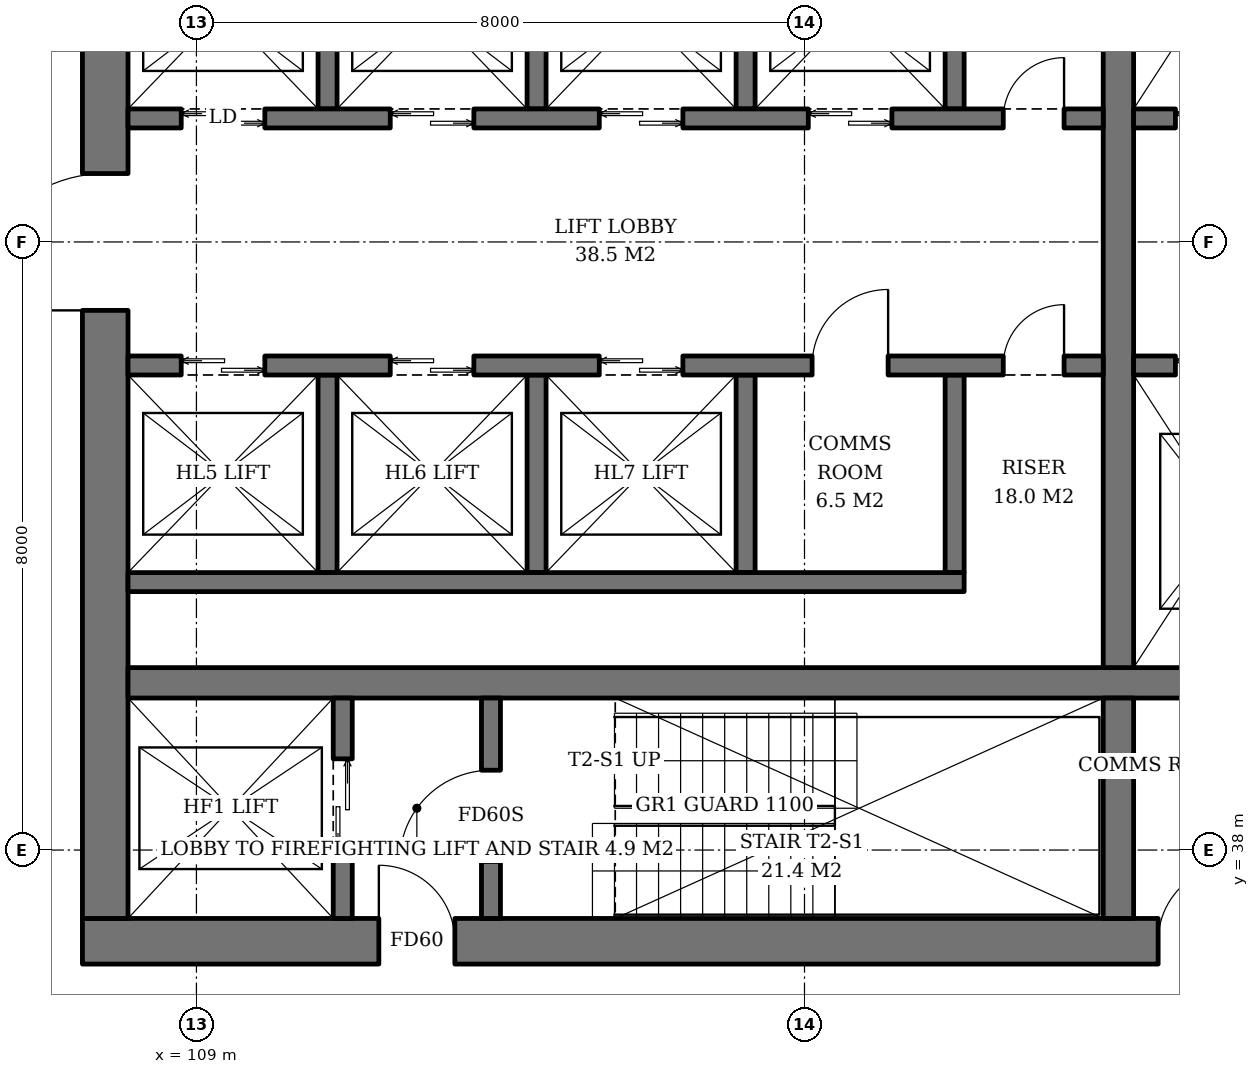
"""IFC4 building model, lengths in metres.
Left out: names, types, materials, properties, quantities, classifications, styles, units other than length and angle.
Written with IfcOpenShell. Run it as: python <this file> out.ifc"""

import sys

from ifc_helpers import new_model, si_unit, direction, frame, frame_2d, origin, place, context, subcontext, project, spatial, rectangle, extrude, element, fill, save


model = new_model("IFC4")
c1 = context("Model", 3, precision=1e-05, world=origin(), true_north=direction((0.0, 1.0)))
c2 = subcontext(c1, "Body", "Model", "MODEL_VIEW")
j1 = project(units=[si_unit("LENGTHUNIT", "METRE"), si_unit("PLANEANGLEUNIT", "RADIAN")], contexts=[c1])
p1 = place(None, origin())
s1 = spatial("IfcSite", under=j1, at=p1, CompositionType="ELEMENT")
p2 = place(p1, origin())
s2 = spatial("IfcBuilding", under=s1, at=p2, CompositionType="ELEMENT")
p3 = place(p2, frame((0.0, 0.0, 97.0)))
s3 = spatial("IfcBuildingStorey", under=s2, at=p3, CompositionType="ELEMENT", Elevation=97.0)
p4 = place(p3, frame((107.5, 36.8, 0.0), z_axis=(0.0, 0.0, 1.0), x_axis=(1.0, 0.0, 0.0)))
e1 = element("IfcWall", 1, at=p4, inside=s3, PredefinedType="SHEAR", context=c2, shape_type="SweptSolid", body=[
    extrude(rectangle(XDim=19.0, YDim=0.6, at=frame_2d((9.5, 0.0))), origin(), (0.0, 0.0, 1.0), 3.8),
])
p5 = place(p4, frame((3.9, 0.0, 0.0)))
e2 = element("IfcOpeningElement", 2, at=p5, cuts=e1, PredefinedType="OPENING", context=c2, shape_type="SweptSolid", body=[
    extrude(rectangle(XDim=1.0, YDim=2.1, at=frame_2d((0.5, 1.05))), frame((0.0, 0.31, 0.0), z_axis=(0.0, -1.0, 0.0), x_axis=(1.0, 0.0, 0.0)), (0.0, 0.0, 1.0), 0.62),
])
p6 = place(p4, frame((14.153, 0.0, 0.0)))
e3 = element("IfcOpeningElement", 3, at=p6, cuts=e1, PredefinedType="OPENING", context=c2, shape_type="SweptSolid", body=[
    extrude(rectangle(XDim=1.0, YDim=2.1, at=frame_2d((0.5, 1.05))), frame((0.0, 0.31, 0.0), z_axis=(0.0, -1.0, 0.0), x_axis=(1.0, 0.0, 0.0)), (0.0, 0.0, 1.0), 0.62),
])
p7 = place(p4, frame((16.2, 0.0, 0.0)))
e4 = element("IfcOpeningElement", 4, at=p7, cuts=e1, PredefinedType="OPENING", context=c2, shape_type="SweptSolid", body=[
    extrude(rectangle(XDim=1.0, YDim=2.1, at=frame_2d((0.5, 1.05))), frame((0.0, 0.31, 0.0), z_axis=(0.0, -1.0, 0.0), x_axis=(1.0, 0.0, 0.0)), (0.0, 0.0, 1.0), 0.62),
])
p8 = place(p3, frame((107.8, 37.1, 0.0), z_axis=(0.0, 0.0, 1.0), x_axis=(0.0, 1.0, 0.0)))
e5 = element("IfcWall", 5, at=p8, inside=s3, PredefinedType="SHEAR", context=c2, shape_type="SweptSolid", body=[
    extrude(rectangle(XDim=17.8, YDim=0.6, at=frame_2d((8.9, 0.0))), origin(), (0.0, 0.0, 1.0), 3.8),
])
p9 = place(p8, frame((8.0, 0.0, 0.0)))
e6 = element("IfcOpeningElement", 6, at=p9, cuts=e5, PredefinedType="OPENING", context=c2, shape_type="SweptSolid", body=[
    extrude(rectangle(XDim=1.8, YDim=2.4, at=frame_2d((0.9, 1.2))), frame((0.0, 0.31, 0.0), z_axis=(0.0, -1.0, 0.0), x_axis=(1.0, 0.0, 0.0)), (0.0, 0.0, 1.0), 0.62),
])
p10 = place(p3, frame((108.1, 40.2, 0.0), z_axis=(0.0, 0.0, 1.0), x_axis=(1.0, 0.0, 0.0)))
e7 = element("IfcWall", 7, at=p10, inside=s3, PredefinedType="SHEAR", context=c2, shape_type="SweptSolid", body=[
    extrude(rectangle(XDim=17.8, YDim=0.4, at=frame_2d((8.9, 0.0))), origin(), (0.0, 0.0, 1.0), 3.8),
])
p11 = place(p3, frame((121.13, 37.1, 0.0), z_axis=(0.0, 0.0, 1.0), x_axis=(0.0, 1.0, 0.0)))
e8 = element("IfcWall", 8, at=p11, inside=s3, PredefinedType="SHEAR", context=c2, shape_type="SweptSolid", body=[
    extrude(rectangle(XDim=2.9, YDim=0.4, at=frame_2d((1.45, 0.0))), origin(), (0.0, 0.0, 1.0), 3.8),
])
p12 = place(p3, frame((121.13, 40.4, 0.0), z_axis=(0.0, 0.0, 1.0), x_axis=(0.0, 1.0, 0.0)))
e9 = element("IfcWall", 9, at=p12, inside=s3, PredefinedType="SHEAR", context=c2, shape_type="SweptSolid", body=[
    extrude(rectangle(XDim=11.2, YDim=0.4, at=frame_2d((5.6, 0.0))), origin(), (0.0, 0.0, 1.0), 3.8),
])
p13 = place(p3, frame((110.925, 37.1, 0.0), z_axis=(0.0, 0.0, 1.0), x_axis=(0.0, 1.0, 0.0)))
e10 = element("IfcWall", 10, at=p13, inside=s3, PredefinedType="SHEAR", context=c2, shape_type="SweptSolid", body=[
    extrude(rectangle(XDim=2.9, YDim=0.25, at=frame_2d((1.45, 0.0))), origin(), (0.0, 0.0, 1.0), 3.8),
])
p14 = place(p13, frame((0.8, 0.0, 0.0)))
e11 = element("IfcOpeningElement", 11, at=p14, cuts=e10, PredefinedType="OPENING", context=c2, shape_type="SweptSolid", body=[
    extrude(rectangle(XDim=1.3, YDim=2.2, at=frame_2d((0.65, 1.1))), frame((0.0, 0.135, 0.0), z_axis=(0.0, -1.0, 0.0), x_axis=(1.0, 0.0, 0.0)), (0.0, 0.0, 1.0), 0.27),
])
p15 = place(p3, frame((112.875, 37.1, 0.0), z_axis=(0.0, 0.0, 1.0), x_axis=(0.0, 1.0, 0.0)))
e12 = element("IfcWall", 12, at=p15, inside=s3, PredefinedType="SHEAR", context=c2, shape_type="SweptSolid", body=[
    extrude(rectangle(XDim=2.9, YDim=0.25, at=frame_2d((1.45, 0.0))), origin(), (0.0, 0.0, 1.0), 3.8),
])
p16 = place(p15, frame((0.75, 0.0, 0.0)))
e13 = element("IfcOpeningElement", 13, at=p16, cuts=e12, PredefinedType="OPENING", context=c2, shape_type="SweptSolid", body=[
    extrude(rectangle(XDim=1.2, YDim=2.1, at=frame_2d((0.6, 1.05))), frame((0.0, 0.135, 0.0), z_axis=(0.0, -1.0, 0.0), x_axis=(1.0, 0.0, 0.0)), (0.0, 0.0, 1.0), 0.27),
])
for number, where, z_axis, x_axis in (
    (14, (110.725, 47.75, 0.0), (0.0, 0.0, 1.0), (0.0, 1.0, 0.0)),
    (15, (113.475, 47.75, 0.0), (0.0, 0.0, 1.0), (0.0, 1.0, 0.0)),
    (16, (116.225, 47.75, 0.0), (0.0, 0.0, 1.0), (0.0, 1.0, 0.0)),
    (17, (118.975, 47.75, 0.0), (0.0, 0.0, 1.0), (0.0, 1.0, 0.0)),
):
    element("IfcWall", number, at=place(p3, frame(where, z_axis=z_axis, x_axis=x_axis)), inside=s3, PredefinedType="SHEAR", context=c2, shape_type="SweptSolid", body=[
        extrude(rectangle(XDim=2.6, YDim=0.25, at=frame_2d((1.3, 0.0))), origin(), (0.0, 0.0, 1.0), 3.8),
    ])
p17 = place(p3, frame((108.1, 47.625, 0.0), z_axis=(0.0, 0.0, 1.0), x_axis=(1.0, 0.0, 0.0)))
e18 = element("IfcWall", 18, at=p17, inside=s3, PredefinedType="SHEAR", context=c2, shape_type="SweptSolid", body=[
    extrude(rectangle(XDim=12.83, YDim=0.25, at=frame_2d((6.415, 0.0))), origin(), (0.0, 0.0, 1.0), 3.8),
])
p18 = place(p17, frame((0.7, 0.0, 0.0)))
e19 = element("IfcOpeningElement", 19, at=p18, cuts=e18, PredefinedType="OPENING", context=c2, shape_type="SweptSolid", body=[
    extrude(rectangle(XDim=1.1, YDim=2.2, at=frame_2d((0.55, 1.1))), frame((0.0, 0.135, 0.0), z_axis=(0.0, -1.0, 0.0), x_axis=(1.0, 0.0, 0.0)), (0.0, 0.0, 1.0), 0.27),
])
p19 = place(p17, frame((3.45, 0.0, 0.0)))
e20 = element("IfcOpeningElement", 20, at=p19, cuts=e18, PredefinedType="OPENING", context=c2, shape_type="SweptSolid", body=[
    extrude(rectangle(XDim=1.1, YDim=2.2, at=frame_2d((0.55, 1.1))), frame((0.0, 0.135, 0.0), z_axis=(0.0, -1.0, 0.0), x_axis=(1.0, 0.0, 0.0)), (0.0, 0.0, 1.0), 0.27),
])
p20 = place(p17, frame((6.2, 0.0, 0.0)))
e21 = element("IfcOpeningElement", 21, at=p20, cuts=e18, PredefinedType="OPENING", context=c2, shape_type="SweptSolid", body=[
    extrude(rectangle(XDim=1.1, YDim=2.2, at=frame_2d((0.55, 1.1))), frame((0.0, 0.135, 0.0), z_axis=(0.0, -1.0, 0.0), x_axis=(1.0, 0.0, 0.0)), (0.0, 0.0, 1.0), 0.27),
])
p21 = place(p17, frame((8.95, 0.0, 0.0)))
e22 = element("IfcOpeningElement", 22, at=p21, cuts=e18, PredefinedType="OPENING", context=c2, shape_type="SweptSolid", body=[
    extrude(rectangle(XDim=1.1, YDim=2.2, at=frame_2d((0.55, 1.1))), frame((0.0, 0.135, 0.0), z_axis=(0.0, -1.0, 0.0), x_axis=(1.0, 0.0, 0.0)), (0.0, 0.0, 1.0), 0.27),
])
p22 = place(p17, frame((11.515, 0.0, 0.0)))
e23 = element("IfcOpeningElement", 23, at=p22, cuts=e18, PredefinedType="OPENING", context=c2, shape_type="SweptSolid", body=[
    extrude(rectangle(XDim=0.8, YDim=2.0, at=frame_2d((0.4, 1.0))), frame((0.0, 0.135, 0.0), z_axis=(0.0, -1.0, 0.0), x_axis=(1.0, 0.0, 0.0)), (0.0, 0.0, 1.0), 0.27),
])
for number, where, z_axis, x_axis in (
    (24, (110.725, 44.25, 0.0), (0.0, 0.0, 1.0), (0.0, -1.0, 0.0)),
    (25, (113.475, 44.25, 0.0), (0.0, 0.0, 1.0), (0.0, -1.0, 0.0)),
    (26, (116.225, 44.25, 0.0), (0.0, 0.0, 1.0), (0.0, -1.0, 0.0)),
    (27, (118.975, 44.25, 0.0), (0.0, 0.0, 1.0), (0.0, -1.0, 0.0)),
):
    element("IfcWall", number, at=place(p3, frame(where, z_axis=z_axis, x_axis=x_axis)), inside=s3, PredefinedType="SHEAR", context=c2, shape_type="SweptSolid", body=[
        extrude(rectangle(XDim=2.6, YDim=0.25, at=frame_2d((1.3, 0.0))), origin(), (0.0, 0.0, 1.0), 3.8),
    ])
p23 = place(p3, frame((108.1, 41.525, 0.0), z_axis=(0.0, 0.0, 1.0), x_axis=(1.0, 0.0, 0.0)))
e28 = element("IfcWall", 28, at=p23, inside=s3, PredefinedType="SHEAR", context=c2, shape_type="SweptSolid", body=[
    extrude(rectangle(XDim=11.0, YDim=0.25, at=frame_2d((5.5, 0.0))), origin(), (0.0, 0.0, 1.0), 3.8),
])
p24 = place(p3, frame((108.1, 44.375, 0.0), z_axis=(0.0, 0.0, 1.0), x_axis=(1.0, 0.0, 0.0)))
e29 = element("IfcWall", 29, at=p24, inside=s3, PredefinedType="SHEAR", context=c2, shape_type="SweptSolid", body=[
    extrude(rectangle(XDim=12.83, YDim=0.25, at=frame_2d((6.415, 0.0))), origin(), (0.0, 0.0, 1.0), 3.8),
])
p25 = place(p24, frame((0.7, 0.0, 0.0)))
e30 = element("IfcOpeningElement", 30, at=p25, cuts=e29, PredefinedType="OPENING", context=c2, shape_type="SweptSolid", body=[
    extrude(rectangle(XDim=1.1, YDim=2.2, at=frame_2d((0.55, 1.1))), frame((0.0, 0.135, 0.0), z_axis=(0.0, -1.0, 0.0), x_axis=(1.0, 0.0, 0.0)), (0.0, 0.0, 1.0), 0.27),
])
p26 = place(p24, frame((3.45, 0.0, 0.0)))
e31 = element("IfcOpeningElement", 31, at=p26, cuts=e29, PredefinedType="OPENING", context=c2, shape_type="SweptSolid", body=[
    extrude(rectangle(XDim=1.1, YDim=2.2, at=frame_2d((0.55, 1.1))), frame((0.0, 0.135, 0.0), z_axis=(0.0, -1.0, 0.0), x_axis=(1.0, 0.0, 0.0)), (0.0, 0.0, 1.0), 0.27),
])
p27 = place(p24, frame((6.2, 0.0, 0.0)))
e32 = element("IfcOpeningElement", 32, at=p27, cuts=e29, PredefinedType="OPENING", context=c2, shape_type="SweptSolid", body=[
    extrude(rectangle(XDim=1.1, YDim=2.2, at=frame_2d((0.55, 1.1))), frame((0.0, 0.135, 0.0), z_axis=(0.0, -1.0, 0.0), x_axis=(1.0, 0.0, 0.0)), (0.0, 0.0, 1.0), 0.27),
])
p28 = place(p24, frame((9.0, 0.0, 0.0)))
e33 = element("IfcOpeningElement", 33, at=p28, cuts=e29, PredefinedType="OPENING", context=c2, shape_type="SweptSolid", body=[
    extrude(rectangle(XDim=1.0, YDim=2.1, at=frame_2d((0.5, 1.05))), frame((0.0, 0.135, 0.0), z_axis=(0.0, -1.0, 0.0), x_axis=(1.0, 0.0, 0.0)), (0.0, 0.0, 1.0), 0.27),
])
p29 = place(p24, frame((11.515, 0.0, 0.0)))
e34 = element("IfcOpeningElement", 34, at=p29, cuts=e29, PredefinedType="OPENING", context=c2, shape_type="SweptSolid", body=[
    extrude(rectangle(XDim=0.8, YDim=2.0, at=frame_2d((0.4, 1.0))), frame((0.0, 0.135, 0.0), z_axis=(0.0, -1.0, 0.0), x_axis=(1.0, 0.0, 0.0)), (0.0, 0.0, 1.0), 0.27),
])
p30 = place(p3, frame((121.33, 47.625, 0.0), z_axis=(0.0, 0.0, 1.0), x_axis=(1.0, 0.0, 0.0)))
e35 = element("IfcWall", 35, at=p30, inside=s3, PredefinedType="SHEAR", context=c2, shape_type="SweptSolid", body=[
    extrude(rectangle(XDim=4.57, YDim=0.25, at=frame_2d((2.285, 0.0))), origin(), (0.0, 0.0, 1.0), 3.8),
])
p31 = place(p30, frame((0.55, 0.0, 0.0)))
e36 = element("IfcOpeningElement", 36, at=p31, cuts=e35, PredefinedType="OPENING", context=c2, shape_type="SweptSolid", body=[
    extrude(rectangle(XDim=1.4, YDim=2.4, at=frame_2d((0.7, 1.2))), frame((0.0, 0.135, 0.0), z_axis=(0.0, -1.0, 0.0), x_axis=(1.0, 0.0, 0.0)), (0.0, 0.0, 1.0), 0.27),
])
p32 = place(p30, frame((3.26, 0.0, 0.0)))
e37 = element("IfcOpeningElement", 37, at=p32, cuts=e35, PredefinedType="OPENING", context=c2, shape_type="SweptSolid", body=[
    extrude(rectangle(XDim=0.8, YDim=2.0, at=frame_2d((0.4, 1.0))), frame((0.0, 0.135, 0.0), z_axis=(0.0, -1.0, 0.0), x_axis=(1.0, 0.0, 0.0)), (0.0, 0.0, 1.0), 0.27),
])
p33 = place(p3, frame((121.33, 44.375, 0.0), z_axis=(0.0, 0.0, 1.0), x_axis=(1.0, 0.0, 0.0)))
e38 = element("IfcWall", 38, at=p33, inside=s3, PredefinedType="SHEAR", context=c2, shape_type="SweptSolid", body=[
    extrude(rectangle(XDim=4.57, YDim=0.25, at=frame_2d((2.285, 0.0))), origin(), (0.0, 0.0, 1.0), 3.8),
])
p34 = place(p33, frame((0.55, 0.0, 0.0)))
e39 = element("IfcOpeningElement", 39, at=p34, cuts=e38, PredefinedType="OPENING", context=c2, shape_type="SweptSolid", body=[
    extrude(rectangle(XDim=1.4, YDim=2.4, at=frame_2d((0.7, 1.2))), frame((0.0, 0.135, 0.0), z_axis=(0.0, -1.0, 0.0), x_axis=(1.0, 0.0, 0.0)), (0.0, 0.0, 1.0), 0.27),
])
p35 = place(p33, frame((3.26, 0.0, 0.0)))
e40 = element("IfcOpeningElement", 40, at=p35, cuts=e38, PredefinedType="OPENING", context=c2, shape_type="SweptSolid", body=[
    extrude(rectangle(XDim=0.8, YDim=2.0, at=frame_2d((0.4, 1.0))), frame((0.0, 0.135, 0.0), z_axis=(0.0, -1.0, 0.0), x_axis=(1.0, 0.0, 0.0)), (0.0, 0.0, 1.0), 0.27),
])
p36 = place(p14, origin())
e41 = element("IfcDoor", 41, at=p36, inside=s3, OperationType="DOUBLE_DOOR_SLIDING", PredefinedType="DOOR", context=c2, shape_type="SweptSolid", body=[
    extrude(rectangle(XDim=1.3, YDim=2.2, at=frame_2d((0.65, 1.1))), frame((0.0, 0.025, 0.0), z_axis=(0.0, -1.0, 0.0), x_axis=(1.0, 0.0, 0.0)), (0.0, 0.0, 1.0), 0.05),
])
fill(e11, e41)
p37 = place(p16, origin())
e42 = element("IfcDoor", 42, at=p37, inside=s3, OperationType="SINGLE_SWING_LEFT", PredefinedType="DOOR", context=c2, shape_type="SweptSolid", body=[
    extrude(rectangle(XDim=1.2, YDim=2.1, at=frame_2d((0.6, 1.05))), frame((0.0, 0.025, 0.0), z_axis=(0.0, -1.0, 0.0), x_axis=(1.0, 0.0, 0.0)), (0.0, 0.0, 1.0), 0.05),
])
fill(e13, e42)
p38 = place(p18, origin())
e43 = element("IfcDoor", 43, at=p38, inside=s3, OperationType="DOUBLE_DOOR_SLIDING", PredefinedType="DOOR", context=c2, shape_type="SweptSolid", body=[
    extrude(rectangle(XDim=1.1, YDim=2.2, at=frame_2d((0.55, 1.1))), frame((0.0, 0.025, 0.0), z_axis=(0.0, -1.0, 0.0), x_axis=(1.0, 0.0, 0.0)), (0.0, 0.0, 1.0), 0.05),
])
fill(e19, e43)
p39 = place(p19, origin())
e44 = element("IfcDoor", 44, at=p39, inside=s3, OperationType="DOUBLE_DOOR_SLIDING", PredefinedType="DOOR", context=c2, shape_type="SweptSolid", body=[
    extrude(rectangle(XDim=1.1, YDim=2.2, at=frame_2d((0.55, 1.1))), frame((0.0, 0.025, 0.0), z_axis=(0.0, -1.0, 0.0), x_axis=(1.0, 0.0, 0.0)), (0.0, 0.0, 1.0), 0.05),
])
fill(e20, e44)
p40 = place(p20, origin())
e45 = element("IfcDoor", 45, at=p40, inside=s3, OperationType="DOUBLE_DOOR_SLIDING", PredefinedType="DOOR", context=c2, shape_type="SweptSolid", body=[
    extrude(rectangle(XDim=1.1, YDim=2.2, at=frame_2d((0.55, 1.1))), frame((0.0, 0.025, 0.0), z_axis=(0.0, -1.0, 0.0), x_axis=(1.0, 0.0, 0.0)), (0.0, 0.0, 1.0), 0.05),
])
fill(e21, e45)
p41 = place(p21, origin())
e46 = element("IfcDoor", 46, at=p41, inside=s3, OperationType="DOUBLE_DOOR_SLIDING", PredefinedType="DOOR", context=c2, shape_type="SweptSolid", body=[
    extrude(rectangle(XDim=1.1, YDim=2.2, at=frame_2d((0.55, 1.1))), frame((0.0, 0.025, 0.0), z_axis=(0.0, -1.0, 0.0), x_axis=(1.0, 0.0, 0.0)), (0.0, 0.0, 1.0), 0.05),
])
fill(e22, e46)
p42 = place(p22, origin())
e47 = element("IfcDoor", 47, at=p42, inside=s3, OperationType="SINGLE_SWING_RIGHT", PredefinedType="DOOR", context=c2, shape_type="SweptSolid", body=[
    extrude(rectangle(XDim=0.8, YDim=2.0, at=frame_2d((0.4, 1.0))), frame((0.0, 0.025, 0.0), z_axis=(0.0, -1.0, 0.0), x_axis=(1.0, 0.0, 0.0)), (0.0, 0.0, 1.0), 0.05),
])
fill(e23, e47)
p43 = place(p25, origin())
e48 = element("IfcDoor", 48, at=p43, inside=s3, OperationType="DOUBLE_DOOR_SLIDING", PredefinedType="DOOR", context=c2, shape_type="SweptSolid", body=[
    extrude(rectangle(XDim=1.1, YDim=2.2, at=frame_2d((0.55, 1.1))), frame((0.0, 0.025, 0.0), z_axis=(0.0, -1.0, 0.0), x_axis=(1.0, 0.0, 0.0)), (0.0, 0.0, 1.0), 0.05),
])
fill(e30, e48)
p44 = place(p26, origin())
e49 = element("IfcDoor", 49, at=p44, inside=s3, OperationType="DOUBLE_DOOR_SLIDING", PredefinedType="DOOR", context=c2, shape_type="SweptSolid", body=[
    extrude(rectangle(XDim=1.1, YDim=2.2, at=frame_2d((0.55, 1.1))), frame((0.0, 0.025, 0.0), z_axis=(0.0, -1.0, 0.0), x_axis=(1.0, 0.0, 0.0)), (0.0, 0.0, 1.0), 0.05),
])
fill(e31, e49)
p45 = place(p27, origin())
e50 = element("IfcDoor", 50, at=p45, inside=s3, OperationType="DOUBLE_DOOR_SLIDING", PredefinedType="DOOR", context=c2, shape_type="SweptSolid", body=[
    extrude(rectangle(XDim=1.1, YDim=2.2, at=frame_2d((0.55, 1.1))), frame((0.0, 0.025, 0.0), z_axis=(0.0, -1.0, 0.0), x_axis=(1.0, 0.0, 0.0)), (0.0, 0.0, 1.0), 0.05),
])
fill(e32, e50)
p46 = place(p28, origin())
e51 = element("IfcDoor", 51, at=p46, inside=s3, OperationType="SINGLE_SWING_RIGHT", PredefinedType="DOOR", context=c2, shape_type="SweptSolid", body=[
    extrude(rectangle(XDim=1.0, YDim=2.1, at=frame_2d((0.5, 1.05))), frame((0.0, 0.025, 0.0), z_axis=(0.0, -1.0, 0.0), x_axis=(1.0, 0.0, 0.0)), (0.0, 0.0, 1.0), 0.05),
])
fill(e33, e51)
p47 = place(p29, origin())
e52 = element("IfcDoor", 52, at=p47, inside=s3, OperationType="SINGLE_SWING_RIGHT", PredefinedType="DOOR", context=c2, shape_type="SweptSolid", body=[
    extrude(rectangle(XDim=0.8, YDim=2.0, at=frame_2d((0.4, 1.0))), frame((0.0, 0.025, 0.0), z_axis=(0.0, -1.0, 0.0), x_axis=(1.0, 0.0, 0.0)), (0.0, 0.0, 1.0), 0.05),
])
fill(e34, e52)
p48 = place(p31, origin())
e53 = element("IfcDoor", 53, at=p48, inside=s3, OperationType="DOUBLE_DOOR_SLIDING", PredefinedType="DOOR", context=c2, shape_type="SweptSolid", body=[
    extrude(rectangle(XDim=1.4, YDim=2.4, at=frame_2d((0.7, 1.2))), frame((0.0, 0.025, 0.0), z_axis=(0.0, -1.0, 0.0), x_axis=(1.0, 0.0, 0.0)), (0.0, 0.0, 1.0), 0.05),
])
fill(e36, e53)
p49 = place(p34, origin())
e54 = element("IfcDoor", 54, at=p49, inside=s3, OperationType="DOUBLE_DOOR_SLIDING", PredefinedType="DOOR", context=c2, shape_type="SweptSolid", body=[
    extrude(rectangle(XDim=1.4, YDim=2.4, at=frame_2d((0.7, 1.2))), frame((0.0, 0.025, 0.0), z_axis=(0.0, -1.0, 0.0), x_axis=(1.0, 0.0, 0.0)), (0.0, 0.0, 1.0), 0.05),
])
fill(e39, e54)
p50 = place(p5, origin())
e55 = element("IfcDoor", 55, at=p50, inside=s3, OperationType="SINGLE_SWING_LEFT", PredefinedType="DOOR", context=c2, shape_type="SweptSolid", body=[
    extrude(rectangle(XDim=1.0, YDim=2.1, at=frame_2d((0.5, 1.05))), frame((0.0, 0.025, 0.0), z_axis=(0.0, -1.0, 0.0), x_axis=(1.0, 0.0, 0.0)), (0.0, 0.0, 1.0), 0.05),
])
fill(e2, e55)
p51 = place(p9, origin())
e56 = element("IfcDoor", 56, at=p51, inside=s3, OperationType="DOUBLE_DOOR_SINGLE_SWING", PredefinedType="DOOR", context=c2, shape_type="SweptSolid", body=[
    extrude(rectangle(XDim=1.8, YDim=2.4, at=frame_2d((0.9, 1.2))), frame((0.0, 0.025, 0.0), z_axis=(0.0, -1.0, 0.0), x_axis=(1.0, 0.0, 0.0)), (0.0, 0.0, 1.0), 0.05),
])
fill(e6, e56)
p52 = place(p6, origin())
e57 = element("IfcDoor", 57, at=p52, inside=s3, OperationType="SINGLE_SWING_RIGHT", PredefinedType="DOOR", context=c2, shape_type="SweptSolid", body=[
    extrude(rectangle(XDim=1.0, YDim=2.1, at=frame_2d((0.5, 1.05))), frame((0.0, 0.29, 0.0), z_axis=(0.0, -1.0, 0.0), x_axis=(1.0, 0.0, 0.0)), (0.0, 0.0, 1.0), 0.05),
])
fill(e3, e57)
save(model, sys.argv[1])
